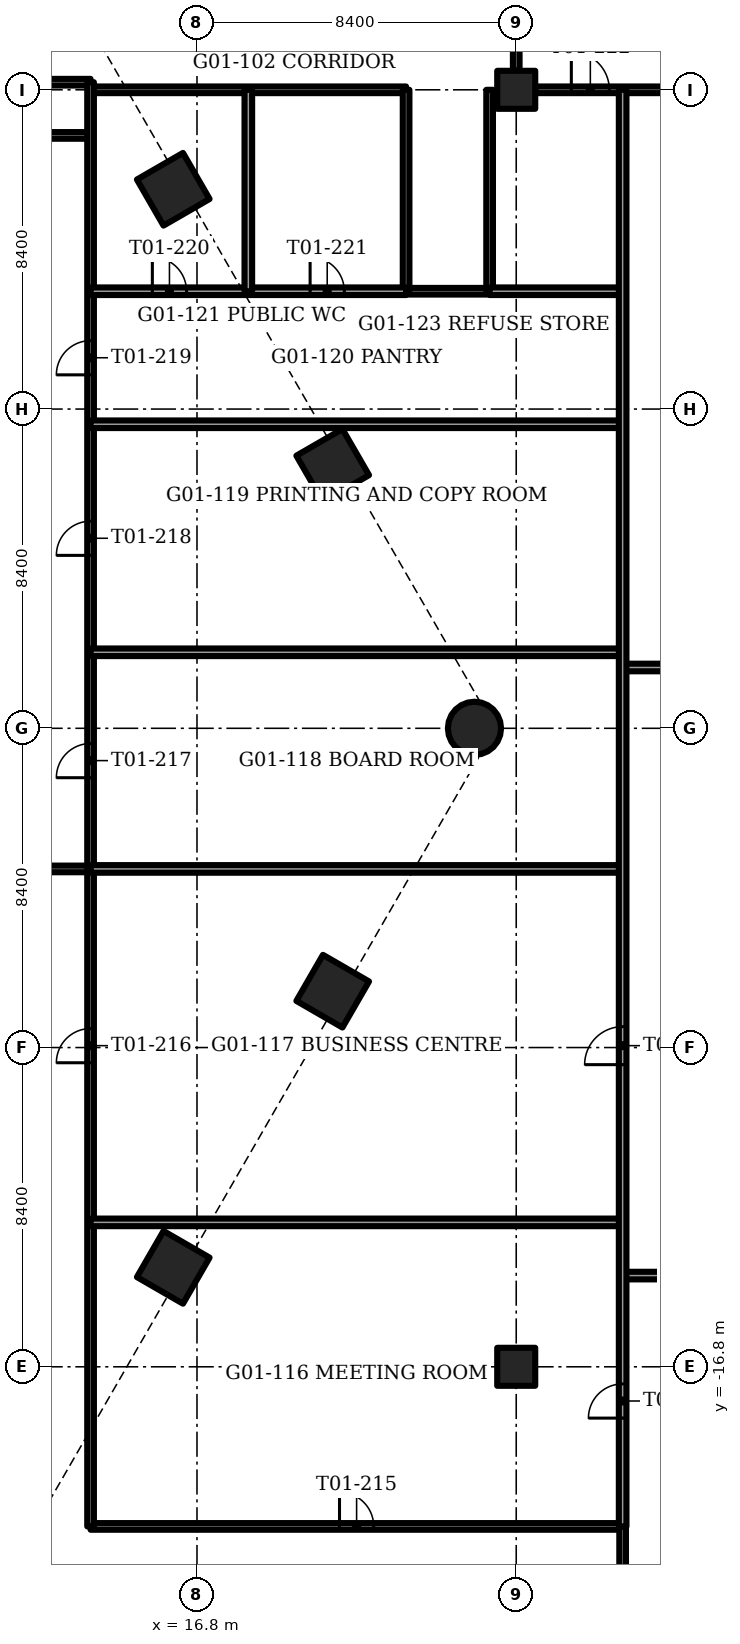
"""IFC4 building model, lengths in metres.
Left out: names, types, materials, properties, quantities, classifications, styles, units other than length and angle.
Written with IfcOpenShell. Run it as: python <this file> out.ifc"""

import sys

from ifc_helpers import new_model, si_unit, direction, frame, frame_2d, origin, origin_2d, place, context, subcontext, project, spatial, rectangle, circle, extrude, element, fill, save


model = new_model("IFC4")
c1 = context("Model", 3, precision=1e-05, world=origin(), true_north=direction((0.0, 1.0)))
c2 = subcontext(c1, "Body", "Model", "MODEL_VIEW")
j1 = project(units=[si_unit("LENGTHUNIT", "METRE"), si_unit("PLANEANGLEUNIT", "RADIAN")], contexts=[c1])
p1 = place(None, origin())
s1 = spatial("IfcSite", under=j1, at=p1, CompositionType="ELEMENT")
p2 = place(p1, origin())
s2 = spatial("IfcBuilding", under=s1, at=p2, CompositionType="ELEMENT")
p3 = place(p2, frame((0.0, 0.0, 6.0)))
s3 = spatial("IfcBuildingStorey", under=s2, at=p3, CompositionType="ELEMENT", Elevation=6.0)
for number, where, z_axis, x_axis in (
    (1, (25.2, -16.8, -0.35), (0.0, 0.0, 1.0), (1.0, 0.0, 0.0)),
    (2, (25.2, 16.8, -0.35), (0.0, 0.0, 1.0), (1.0, 0.0, 0.0)),
):
    element("IfcColumn", number, at=place(p3, frame(where, z_axis=z_axis, x_axis=x_axis)), inside=s3, PredefinedType="COLUMN", context=c2, shape_type="SweptSolid", body=[
        extrude(rectangle(XDim=1.0, YDim=1.0, at=origin_2d()), origin(), (0.0, 0.0, 1.0), 4.0),
    ])
p4 = place(p3, frame((24.101, 0.0, -1.2), z_axis=(0.0, 0.0, 1.0), x_axis=(1.0, 0.0, 0.0)))
e3 = element("IfcColumn", 3, at=p4, inside=s3, PredefinedType="COLUMN", context=c2, shape_type="SweptSolid", body=[
    extrude(circle(Radius=0.7, at=origin_2d()), origin(), (0.0, 0.0, 1.0), 4.0),
])
for number, where, z_axis, x_axis in (
    (4, (16.175, -14.183, -1.2), (0.0, 0.0, 1.0), (-0.5, -0.866, 0.0)),
    (5, (20.371, -6.917, -1.2), (0.0, 0.0, 1.0), (-0.5, -0.866, 0.0)),
    (6, (20.371, 6.917, -1.2), (0.0, 0.0, 1.0), (0.5, -0.866, 0.0)),
    (7, (16.175, 14.183, -1.2), (0.0, 0.0, 1.0), (0.5, -0.866, 0.0)),
):
    element("IfcColumn", number, at=place(p3, frame(where, z_axis=z_axis, x_axis=x_axis)), inside=s3, PredefinedType="COLUMN", context=c2, shape_type="SweptSolid", body=[
        extrude(rectangle(XDim=1.4, YDim=1.4, at=origin_2d()), origin(), (0.0, 0.0, 1.0), 4.0),
    ])
p5 = place(p3, frame((14.0, -21.0, 0.0), z_axis=(0.0, 0.0, 1.0), x_axis=(1.0, 0.0, 0.0)))
e8 = element("IfcWall", 8, at=p5, inside=s3, PredefinedType="PARTITIONING", context=c2, shape_type="SweptSolid", body=[
    extrude(rectangle(XDim=14.0, YDim=0.175, at=frame_2d((7.0, 0.0))), origin(), (0.0, 0.0, 1.0), 3.65),
])
p6 = place(p5, frame((6.55, 0.0, 0.0)))
e9 = element("IfcOpeningElement", 9, at=p6, cuts=e8, PredefinedType="OPENING", context=c2, shape_type="SweptSolid", body=[
    extrude(rectangle(XDim=0.9, YDim=2.1, at=frame_2d((0.45, 1.05))), frame((0.0, 0.087, 0.0), z_axis=(0.0, -1.0, 0.0), x_axis=(1.0, 0.0, 0.0)), (0.0, 0.0, 1.0), 0.175),
])
p7 = place(p3, frame((9.38, -3.7, 0.0), z_axis=(0.0, 0.0, 1.0), x_axis=(1.0, 0.0, 0.0)))
e10 = element("IfcWall", 10, at=p7, inside=s3, PredefinedType="PARTITIONING", context=c2, shape_type="SweptSolid", body=[
    extrude(rectangle(XDim=4.62, YDim=0.175, at=frame_2d((2.31, 0.0))), origin(), (0.0, 0.0, 1.0), 3.65),
])
p8 = place(p3, frame((22.302, 11.5, 0.0), z_axis=(0.0, 0.0, 1.0), x_axis=(1.0, 0.0, 0.0)))
e11 = element("IfcWall", 11, at=p8, inside=s3, PredefinedType="PARTITIONING", context=c2, shape_type="SweptSolid", body=[
    extrude(rectangle(XDim=2.198, YDim=0.175, at=frame_2d((1.099, 0.0))), origin(), (0.0, 0.0, 1.0), 3.65),
])
p9 = place(p3, frame((-14.0, 15.6, 0.0), z_axis=(0.0, 0.0, 1.0), x_axis=(1.0, 0.0, 0.0)))
e12 = element("IfcWall", 12, at=p9, inside=s3, PredefinedType="PARTITIONING", context=c2, shape_type="SweptSolid", body=[
    extrude(rectangle(XDim=28.0, YDim=0.175, at=frame_2d((14.0, 0.0))), origin(), (0.0, 0.0, 1.0), 3.65),
])
p10 = place(p9, frame((13.2, 0.0, 0.0)))
e13 = element("IfcOpeningElement", 13, at=p10, cuts=e12, PredefinedType="OPENING", context=c2, shape_type="SweptSolid", body=[
    extrude(rectangle(XDim=1.6, YDim=2.1, at=frame_2d((0.8, 1.05))), frame((0.0, 0.087, 0.0), z_axis=(0.0, -1.0, 0.0), x_axis=(1.0, 0.0, 0.0)), (0.0, 0.0, 1.0), 0.175),
])
p11 = place(p3, frame((14.0, 16.8, 0.0), z_axis=(0.0, 0.0, 1.0), x_axis=(1.0, 0.0, 0.0)))
e14 = element("IfcWall", 14, at=p11, inside=s3, PredefinedType="PARTITIONING", context=c2, shape_type="SweptSolid", body=[
    extrude(rectangle(XDim=8.302, YDim=0.175, at=frame_2d((4.151, 0.0))), origin(), (0.0, 0.0, 1.0), 2.8),
])
p12 = place(p3, frame((25.7, 16.8, 0.0), z_axis=(0.0, 0.0, 1.0), x_axis=(1.0, 0.0, 0.0)))
e15 = element("IfcWall", 15, at=p12, inside=s3, PredefinedType="PARTITIONING", context=c2, shape_type="SweptSolid", body=[
    extrude(rectangle(XDim=7.4, YDim=0.175, at=frame_2d((3.7, 0.0))), origin(), (0.0, 0.0, 1.0), 3.65),
])
p13 = place(p12, frame((0.95, 0.0, 0.0)))
e16 = element("IfcOpeningElement", 16, at=p13, cuts=e15, PredefinedType="OPENING", context=c2, shape_type="SweptSolid", body=[
    extrude(rectangle(XDim=1.0, YDim=2.1, at=frame_2d((0.5, 1.05))), frame((0.0, 0.087, 0.0), z_axis=(0.0, -1.0, 0.0), x_axis=(1.0, 0.0, 0.0)), (0.0, 0.0, 1.0), 0.175),
])
p14 = place(p3, frame((-14.0, 17.0, 0.0), z_axis=(0.0, 0.0, 1.0), x_axis=(1.0, 0.0, 0.0)))
e17 = element("IfcWall", 17, at=p14, inside=s3, PredefinedType="PARTITIONING", context=c2, shape_type="SweptSolid", body=[
    extrude(rectangle(XDim=28.0, YDim=0.175, at=frame_2d((14.0, 0.0))), origin(), (0.0, 0.0, 1.0), 3.65),
])
p15 = place(p14, frame((13.2, 0.0, 0.0)))
e18 = element("IfcOpeningElement", 18, at=p15, cuts=e17, PredefinedType="OPENING", context=c2, shape_type="SweptSolid", body=[
    extrude(rectangle(XDim=1.6, YDim=2.1, at=frame_2d((0.8, 1.05))), frame((0.0, 0.087, 0.0), z_axis=(0.0, -1.0, 0.0), x_axis=(1.0, 0.0, 0.0)), (0.0, 0.0, 1.0), 0.175),
])
p16 = place(p3, frame((14.0, -21.0, 0.0), z_axis=(0.0, 0.0, 1.0), x_axis=(0.0, 1.0, 0.0)))
e19 = element("IfcWall", 19, at=p16, inside=s3, PredefinedType="PARTITIONING", context=c2, shape_type="SweptSolid", body=[
    extrude(rectangle(XDim=38.0, YDim=0.175, at=frame_2d((19.0, 0.0))), origin(), (0.0, 0.0, 1.0), 2.8),
])
p17 = place(p16, frame((12.2, 0.0, 0.0)))
e20 = element("IfcOpeningElement", 20, at=p17, cuts=e19, PredefinedType="OPENING", context=c2, shape_type="SweptSolid", body=[
    extrude(rectangle(XDim=0.9, YDim=2.1, at=frame_2d((0.45, 1.05))), frame((0.0, 0.087, 0.0), z_axis=(0.0, -1.0, 0.0), x_axis=(1.0, 0.0, 0.0)), (0.0, 0.0, 1.0), 0.175),
])
p18 = place(p16, frame((19.7, 0.0, 0.0)))
e21 = element("IfcOpeningElement", 21, at=p18, cuts=e19, PredefinedType="OPENING", context=c2, shape_type="SweptSolid", body=[
    extrude(rectangle(XDim=0.9, YDim=2.1, at=frame_2d((0.45, 1.05))), frame((0.0, 0.087, 0.0), z_axis=(0.0, -1.0, 0.0), x_axis=(1.0, 0.0, 0.0)), (0.0, 0.0, 1.0), 0.175),
])
p19 = place(p16, frame((25.55, 0.0, 0.0)))
e22 = element("IfcOpeningElement", 22, at=p19, cuts=e19, PredefinedType="OPENING", context=c2, shape_type="SweptSolid", body=[
    extrude(rectangle(XDim=0.9, YDim=2.1, at=frame_2d((0.45, 1.05))), frame((0.0, 0.087, 0.0), z_axis=(0.0, -1.0, 0.0), x_axis=(1.0, 0.0, 0.0)), (0.0, 0.0, 1.0), 0.175),
])
p20 = place(p16, frame((30.3, 0.0, 0.0)))
e23 = element("IfcOpeningElement", 23, at=p20, cuts=e19, PredefinedType="OPENING", context=c2, shape_type="SweptSolid", body=[
    extrude(rectangle(XDim=0.9, YDim=2.1, at=frame_2d((0.45, 1.05))), frame((0.0, 0.087, 0.0), z_axis=(0.0, -1.0, 0.0), x_axis=(1.0, 0.0, 0.0)), (0.0, 0.0, 1.0), 0.175),
])
for number, where, z_axis, x_axis in (
    (24, (22.302, 11.5, 0.0), (0.0, 0.0, 1.0), (0.0, 1.0, 0.0)),
    (25, (24.5, 11.5, 0.0), (0.0, 0.0, 1.0), (0.0, 1.0, 0.0)),
):
    element("IfcWall", number, at=place(p3, frame(where, z_axis=z_axis, x_axis=x_axis)), inside=s3, PredefinedType="PARTITIONING", context=c2, shape_type="SweptSolid", body=[
        extrude(rectangle(XDim=5.3, YDim=0.175, at=frame_2d((2.65, 0.0))), origin(), (0.0, 0.0, 1.0), 3.65),
    ])
p21 = place(p3, frame((25.2, 17.3, 0.0), z_axis=(0.0, 0.0, 1.0), x_axis=(0.0, 1.0, 0.0)))
e26 = element("IfcWall", 26, at=p21, inside=s3, PredefinedType="PARTITIONING", context=c2, shape_type="SweptSolid", body=[
    extrude(rectangle(XDim=7.4, YDim=0.175, at=frame_2d((3.7, 0.0))), origin(), (0.0, 0.0, 1.0), 3.65),
])
p22 = place(p21, frame((2.275, 0.0, 0.0)))
e27 = element("IfcOpeningElement", 27, at=p22, cuts=e26, PredefinedType="OPENING", context=c2, shape_type="SweptSolid", body=[
    extrude(rectangle(XDim=1.6, YDim=2.1, at=frame_2d((0.8, 1.05))), frame((0.0, 0.087, 0.0), z_axis=(0.0, -1.0, 0.0), x_axis=(1.0, 0.0, 0.0)), (0.0, 0.0, 1.0), 0.175),
])
p23 = place(p3, frame((28.0, -27.62, 0.0), z_axis=(0.0, 0.0, 1.0), x_axis=(0.0, 1.0, 0.0)))
e28 = element("IfcWall", 28, at=p23, inside=s3, PredefinedType="PARTITIONING", context=c2, shape_type="SweptSolid", body=[
    extrude(rectangle(XDim=6.62, YDim=0.175, at=frame_2d((3.31, 0.0))), origin(), (0.0, 0.0, 1.0), 3.65),
])
p24 = place(p3, frame((28.0, -14.4, 0.0), z_axis=(0.0, 0.0, 1.0), x_axis=(1.0, 0.0, 0.0)))
e29 = element("IfcWall", 29, at=p24, inside=s3, PredefinedType="PARTITIONING", context=c2, shape_type="SweptSolid", body=[
    extrude(rectangle(XDim=5.395, YDim=0.2, at=frame_2d((2.698, 0.0))), origin(), (0.0, 0.0, 1.0), 3.65),
])
for number, where, z_axis, x_axis in (
    (30, (14.0, -13.0, 0.0), (0.0, 0.0, 1.0), (1.0, 0.0, 0.0)),
    (31, (14.0, -3.7, 0.0), (0.0, 0.0, 1.0), (1.0, 0.0, 0.0)),
):
    element("IfcWall", number, at=place(p3, frame(where, z_axis=z_axis, x_axis=x_axis)), inside=s3, PredefinedType="PARTITIONING", context=c2, shape_type="SweptSolid", body=[
        extrude(rectangle(XDim=14.0, YDim=0.2, at=frame_2d((7.0, 0.0))), origin(), (0.0, 0.0, 1.0), 2.8),
    ])
p25 = place(p3, frame((28.0, 1.6, 0.0), z_axis=(0.0, 0.0, 1.0), x_axis=(1.0, 0.0, 0.0)))
e32 = element("IfcWall", 32, at=p25, inside=s3, PredefinedType="PARTITIONING", context=c2, shape_type="SweptSolid", body=[
    extrude(rectangle(XDim=13.62, YDim=0.2, at=frame_2d((6.81, 0.0))), origin(), (0.0, 0.0, 1.0), 3.65),
])
for number, where, z_axis, x_axis in (
    (33, (14.0, 2.0, 0.0), (0.0, 0.0, 1.0), (1.0, 0.0, 0.0)),
    (34, (14.0, 8.0, 0.0), (0.0, 0.0, 1.0), (1.0, 0.0, 0.0)),
):
    element("IfcWall", number, at=place(p3, frame(where, z_axis=z_axis, x_axis=x_axis)), inside=s3, PredefinedType="PARTITIONING", context=c2, shape_type="SweptSolid", body=[
        extrude(rectangle(XDim=14.0, YDim=0.2, at=frame_2d((7.0, 0.0))), origin(), (0.0, 0.0, 1.0), 2.8),
    ])
p26 = place(p3, frame((14.0, 11.5, 0.0), z_axis=(0.0, 0.0, 1.0), x_axis=(1.0, 0.0, 0.0)))
e35 = element("IfcWall", 35, at=p26, inside=s3, PredefinedType="PARTITIONING", context=c2, shape_type="SweptSolid", body=[
    extrude(rectangle(XDim=8.302, YDim=0.2, at=frame_2d((4.151, 0.0))), origin(), (0.0, 0.0, 1.0), 2.8),
])
p27 = place(p26, frame((1.625, 0.0, 0.0)))
e36 = element("IfcOpeningElement", 36, at=p27, cuts=e35, PredefinedType="OPENING", context=c2, shape_type="SweptSolid", body=[
    extrude(rectangle(XDim=0.9, YDim=2.1, at=frame_2d((0.45, 1.05))), frame((0.0, 0.1, 0.0), z_axis=(0.0, -1.0, 0.0), x_axis=(1.0, 0.0, 0.0)), (0.0, 0.0, 1.0), 0.2),
])
p28 = place(p26, frame((5.776, 0.0, 0.0)))
e37 = element("IfcOpeningElement", 37, at=p28, cuts=e35, PredefinedType="OPENING", context=c2, shape_type="SweptSolid", body=[
    extrude(rectangle(XDim=0.9, YDim=2.1, at=frame_2d((0.45, 1.05))), frame((0.0, 0.1, 0.0), z_axis=(0.0, -1.0, 0.0), x_axis=(1.0, 0.0, 0.0)), (0.0, 0.0, 1.0), 0.2),
])
p29 = place(p3, frame((24.5, 11.5, 0.0), z_axis=(0.0, 0.0, 1.0), x_axis=(1.0, 0.0, 0.0)))
e38 = element("IfcWall", 38, at=p29, inside=s3, PredefinedType="PARTITIONING", context=c2, shape_type="SweptSolid", body=[
    extrude(rectangle(XDim=3.5, YDim=0.2, at=frame_2d((1.75, 0.0))), origin(), (0.0, 0.0, 1.0), 3.65),
])
p30 = place(p3, frame((18.151, 11.5, 0.0), z_axis=(0.0, 0.0, 1.0), x_axis=(0.0, 1.0, 0.0)))
e39 = element("IfcWall", 39, at=p30, inside=s3, PredefinedType="PARTITIONING", context=c2, shape_type="SweptSolid", body=[
    extrude(rectangle(XDim=5.3, YDim=0.2, at=frame_2d((2.65, 0.0))), origin(), (0.0, 0.0, 1.0), 2.8),
])
p31 = place(p3, frame((28.0, -21.0, 0.0), z_axis=(0.0, 0.0, 1.0), x_axis=(0.0, 1.0, 0.0)))
e40 = element("IfcWall", 40, at=p31, inside=s3, PredefinedType="PARTITIONING", context=c2, shape_type="SweptSolid", body=[
    extrude(rectangle(XDim=37.8, YDim=0.2, at=frame_2d((18.9, 0.0))), origin(), (0.0, 0.0, 1.0), 3.65),
])
p32 = place(p31, frame((2.85, 0.0, 0.0)))
e41 = element("IfcOpeningElement", 41, at=p32, cuts=e40, PredefinedType="OPENING", context=c2, shape_type="SweptSolid", body=[
    extrude(rectangle(XDim=0.9, YDim=2.1, at=frame_2d((0.45, 1.05))), frame((0.0, 0.1, 0.0), z_axis=(0.0, -1.0, 0.0), x_axis=(1.0, 0.0, 0.0)), (0.0, 0.0, 1.0), 0.2),
])
p33 = place(p31, frame((12.15, 0.0, 0.0)))
e42 = element("IfcOpeningElement", 42, at=p33, cuts=e40, PredefinedType="OPENING", context=c2, shape_type="SweptSolid", body=[
    extrude(rectangle(XDim=1.0, YDim=2.1, at=frame_2d((0.5, 1.05))), frame((0.0, 0.1, 0.0), z_axis=(0.0, -1.0, 0.0), x_axis=(1.0, 0.0, 0.0)), (0.0, 0.0, 1.0), 0.2),
])
p34 = place(p6, origin())
e43 = element("IfcDoor", 43, at=p34, inside=s3, OperationType="SINGLE_SWING_LEFT", PredefinedType="DOOR", context=c2, shape_type="SweptSolid", body=[
    extrude(rectangle(XDim=0.9, YDim=2.1, at=frame_2d((0.45, 1.05))), frame((0.0, 0.025, 0.0), z_axis=(0.0, -1.0, 0.0), x_axis=(1.0, 0.0, 0.0)), (0.0, 0.0, 1.0), 0.05),
])
fill(e9, e43)
p35 = place(p17, origin())
e44 = element("IfcDoor", 44, at=p35, inside=s3, OperationType="SINGLE_SWING_RIGHT", PredefinedType="DOOR", context=c2, shape_type="SweptSolid", body=[
    extrude(rectangle(XDim=0.9, YDim=2.1, at=frame_2d((0.45, 1.05))), frame((0.0, 0.025, 0.0), z_axis=(0.0, -1.0, 0.0), x_axis=(1.0, 0.0, 0.0)), (0.0, 0.0, 1.0), 0.05),
])
fill(e20, e44)
p36 = place(p18, origin())
e45 = element("IfcDoor", 45, at=p36, inside=s3, OperationType="SINGLE_SWING_LEFT", PredefinedType="DOOR", context=c2, shape_type="SweptSolid", body=[
    extrude(rectangle(XDim=0.9, YDim=2.1, at=frame_2d((0.45, 1.05))), frame((0.0, 0.025, 0.0), z_axis=(0.0, -1.0, 0.0), x_axis=(1.0, 0.0, 0.0)), (0.0, 0.0, 1.0), 0.05),
])
fill(e21, e45)
p37 = place(p19, origin())
e46 = element("IfcDoor", 46, at=p37, inside=s3, OperationType="SINGLE_SWING_RIGHT", PredefinedType="DOOR", context=c2, shape_type="SweptSolid", body=[
    extrude(rectangle(XDim=0.9, YDim=2.1, at=frame_2d((0.45, 1.05))), frame((0.0, 0.025, 0.0), z_axis=(0.0, -1.0, 0.0), x_axis=(1.0, 0.0, 0.0)), (0.0, 0.0, 1.0), 0.05),
])
fill(e22, e46)
p38 = place(p20, origin())
e47 = element("IfcDoor", 47, at=p38, inside=s3, OperationType="SINGLE_SWING_LEFT", PredefinedType="DOOR", context=c2, shape_type="SweptSolid", body=[
    extrude(rectangle(XDim=0.9, YDim=2.1, at=frame_2d((0.45, 1.05))), frame((0.0, 0.025, 0.0), z_axis=(0.0, -1.0, 0.0), x_axis=(1.0, 0.0, 0.0)), (0.0, 0.0, 1.0), 0.05),
])
fill(e23, e47)
p39 = place(p27, origin())
e48 = element("IfcDoor", 48, at=p39, inside=s3, OperationType="SINGLE_SWING_RIGHT", PredefinedType="DOOR", context=c2, shape_type="SweptSolid", body=[
    extrude(rectangle(XDim=0.9, YDim=2.1, at=frame_2d((0.45, 1.05))), frame((0.0, 0.025, 0.0), z_axis=(0.0, -1.0, 0.0), x_axis=(1.0, 0.0, 0.0)), (0.0, 0.0, 1.0), 0.05),
])
fill(e36, e48)
p40 = place(p28, origin())
e49 = element("IfcDoor", 49, at=p40, inside=s3, OperationType="SINGLE_SWING_LEFT", PredefinedType="DOOR", context=c2, shape_type="SweptSolid", body=[
    extrude(rectangle(XDim=0.9, YDim=2.1, at=frame_2d((0.45, 1.05))), frame((0.0, 0.025, 0.0), z_axis=(0.0, -1.0, 0.0), x_axis=(1.0, 0.0, 0.0)), (0.0, 0.0, 1.0), 0.05),
])
fill(e37, e49)
p41 = place(p13, origin())
e50 = element("IfcDoor", 50, at=p41, inside=s3, OperationType="SINGLE_SWING_RIGHT", PredefinedType="DOOR", context=c2, shape_type="SweptSolid", body=[
    extrude(rectangle(XDim=1.0, YDim=2.1, at=frame_2d((0.5, 1.05))), frame((0.0, 0.025, 0.0), z_axis=(0.0, -1.0, 0.0), x_axis=(1.0, 0.0, 0.0)), (0.0, 0.0, 1.0), 0.05),
])
fill(e16, e50)
p42 = place(p32, origin())
e51 = element("IfcDoor", 51, at=p42, inside=s3, OperationType="SINGLE_SWING_RIGHT", PredefinedType="DOOR", context=c2, shape_type="SweptSolid", body=[
    extrude(rectangle(XDim=0.9, YDim=2.1, at=frame_2d((0.45, 1.05))), frame((0.0, 0.025, 0.0), z_axis=(0.0, -1.0, 0.0), x_axis=(1.0, 0.0, 0.0)), (0.0, 0.0, 1.0), 0.05),
])
fill(e41, e51)
p43 = place(p33, origin())
e52 = element("IfcDoor", 52, at=p43, inside=s3, OperationType="SINGLE_SWING_LEFT", PredefinedType="DOOR", context=c2, shape_type="SweptSolid", body=[
    extrude(rectangle(XDim=1.0, YDim=2.1, at=frame_2d((0.5, 1.05))), frame((0.0, 0.025, 0.0), z_axis=(0.0, -1.0, 0.0), x_axis=(1.0, 0.0, 0.0)), (0.0, 0.0, 1.0), 0.05),
])
fill(e42, e52)
save(model, sys.argv[1])
